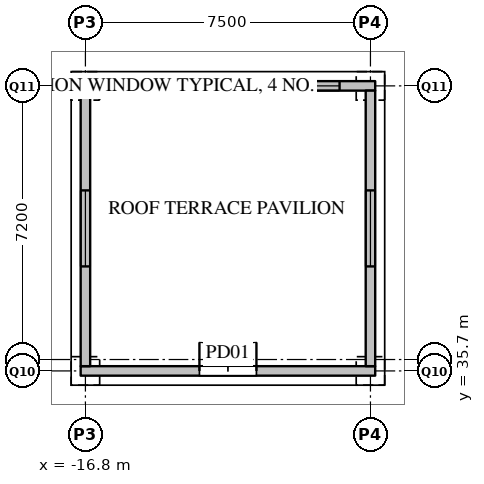
"""IFC4 building model, lengths in metres.
Left out: names, types, materials, properties, quantities, classifications, styles, units other than length and angle.
Written with IfcOpenShell. Run it as: python <this file> out.ifc"""

import sys

from ifc_helpers import new_model, si_unit, direction, frame, frame_2d, origin, place, context, subcontext, project, spatial, rectangle, extrude, element, fill, save


model = new_model("IFC4")
c1 = context("Model", 3, precision=1e-05, world=origin(), true_north=direction((0.0, 1.0)))
c2 = subcontext(c1, "Body", "Model", "MODEL_VIEW")
j1 = project(units=[si_unit("LENGTHUNIT", "METRE"), si_unit("PLANEANGLEUNIT", "RADIAN")], contexts=[c1])
p1 = place(None, origin())
s1 = spatial("IfcSite", under=j1, at=p1, CompositionType="ELEMENT")
p2 = place(p1, origin())
s2 = spatial("IfcBuilding", under=s1, at=p2, CompositionType="ELEMENT")
p3 = place(p2, frame((0.0, 0.0, 26.0)))
s3 = spatial("IfcBuildingStorey", under=s2, at=p3, CompositionType="ELEMENT", Elevation=26.0)
p4 = place(p3, frame((-16.925, 35.7, 0.0), z_axis=(0.0, 0.0, 1.0), x_axis=(1.0, 0.0, 0.0)))
e1 = element("IfcWall", 1, at=p4, inside=s3, PredefinedType="SOLIDWALL", context=c2, shape_type="SweptSolid", body=[
    extrude(rectangle(XDim=7.75, YDim=0.25, at=frame_2d((3.875, 0.0))), origin(), (0.0, 0.0, 1.0), 3.2),
])
p5 = place(p4, frame((3.125, 0.0, 0.0)))
e2 = element("IfcOpeningElement", 2, at=p5, cuts=e1, PredefinedType="OPENING", context=c2, shape_type="SweptSolid", body=[
    extrude(rectangle(XDim=1.5, YDim=2.1, at=frame_2d((0.75, 1.05))), frame((0.0, 0.135, 0.0), z_axis=(0.0, -1.0, 0.0), x_axis=(1.0, 0.0, 0.0)), (0.0, 0.0, 1.0), 0.27),
])
p6 = place(p3, frame((-16.925, 43.2, 0.0), z_axis=(0.0, 0.0, 1.0), x_axis=(1.0, 0.0, 0.0)))
e3 = element("IfcWall", 3, at=p6, inside=s3, PredefinedType="SOLIDWALL", context=c2, shape_type="SweptSolid", body=[
    extrude(rectangle(XDim=7.75, YDim=0.25, at=frame_2d((3.875, 0.0))), origin(), (0.0, 0.0, 1.0), 3.2),
])
p7 = place(p6, frame((0.938, 0.0, 0.9)))
e4 = element("IfcOpeningElement", 4, at=p7, cuts=e3, PredefinedType="OPENING", context=c2, shape_type="SweptSolid", body=[
    extrude(rectangle(XDim=2.0, YDim=1.5, at=frame_2d((1.0, 0.75))), frame((0.0, 0.135, 0.0), z_axis=(0.0, -1.0, 0.0), x_axis=(1.0, 0.0, 0.0)), (0.0, 0.0, 1.0), 0.27),
])
p8 = place(p6, frame((4.812, 0.0, 0.9)))
e5 = element("IfcOpeningElement", 5, at=p8, cuts=e3, PredefinedType="OPENING", context=c2, shape_type="SweptSolid", body=[
    extrude(rectangle(XDim=2.0, YDim=1.5, at=frame_2d((1.0, 0.75))), frame((0.0, 0.135, 0.0), z_axis=(0.0, -1.0, 0.0), x_axis=(1.0, 0.0, 0.0)), (0.0, 0.0, 1.0), 0.27),
])
p9 = place(p3, frame((-16.8, 35.825, 0.0), z_axis=(0.0, 0.0, 1.0), x_axis=(0.0, 1.0, 0.0)))
e6 = element("IfcWall", 6, at=p9, inside=s3, PredefinedType="SOLIDWALL", context=c2, shape_type="SweptSolid", body=[
    extrude(rectangle(XDim=7.25, YDim=0.25, at=frame_2d((3.625, 0.0))), origin(), (0.0, 0.0, 1.0), 3.2),
])
p10 = place(p9, frame((2.625, 0.0, 0.9)))
e7 = element("IfcOpeningElement", 7, at=p10, cuts=e6, PredefinedType="OPENING", context=c2, shape_type="SweptSolid", body=[
    extrude(rectangle(XDim=2.0, YDim=1.5, at=frame_2d((1.0, 0.75))), frame((0.0, 0.135, 0.0), z_axis=(0.0, -1.0, 0.0), x_axis=(1.0, 0.0, 0.0)), (0.0, 0.0, 1.0), 0.27),
])
p11 = place(p3, frame((-9.3, 35.825, 0.0), z_axis=(0.0, 0.0, 1.0), x_axis=(0.0, 1.0, 0.0)))
e8 = element("IfcWall", 8, at=p11, inside=s3, PredefinedType="SOLIDWALL", context=c2, shape_type="SweptSolid", body=[
    extrude(rectangle(XDim=7.25, YDim=0.25, at=frame_2d((3.625, 0.0))), origin(), (0.0, 0.0, 1.0), 3.2),
])
p12 = place(p11, frame((2.625, 0.0, 0.9)))
e9 = element("IfcOpeningElement", 9, at=p12, cuts=e8, PredefinedType="OPENING", context=c2, shape_type="SweptSolid", body=[
    extrude(rectangle(XDim=2.0, YDim=1.5, at=frame_2d((1.0, 0.75))), frame((0.0, 0.135, 0.0), z_axis=(0.0, -1.0, 0.0), x_axis=(1.0, 0.0, 0.0)), (0.0, 0.0, 1.0), 0.27),
])
p13 = place(p5, origin())
e10 = element("IfcDoor", 10, at=p13, inside=s3, OperationType="DOUBLE_DOOR_SINGLE_SWING", PredefinedType="DOOR", context=c2, shape_type="SweptSolid", body=[
    extrude(rectangle(XDim=1.5, YDim=2.1, at=frame_2d((0.75, 1.05))), frame((0.0, 0.025, 0.0), z_axis=(0.0, -1.0, 0.0), x_axis=(1.0, 0.0, 0.0)), (0.0, 0.0, 1.0), 0.05),
])
fill(e2, e10)
p14 = place(p7, origin())
e11 = element("IfcWindow", 11, at=p14, inside=s3, PartitioningType="SINGLE_PANEL", PredefinedType="WINDOW", context=c2, shape_type="SweptSolid", body=[
    extrude(rectangle(XDim=2.0, YDim=1.5, at=frame_2d((1.0, 0.75))), frame((0.0, 0.03, 0.0), z_axis=(0.0, -1.0, 0.0), x_axis=(1.0, 0.0, 0.0)), (0.0, 0.0, 1.0), 0.06),
])
fill(e4, e11)
p15 = place(p8, origin())
e12 = element("IfcWindow", 12, at=p15, inside=s3, PartitioningType="SINGLE_PANEL", PredefinedType="WINDOW", context=c2, shape_type="SweptSolid", body=[
    extrude(rectangle(XDim=2.0, YDim=1.5, at=frame_2d((1.0, 0.75))), frame((0.0, 0.03, 0.0), z_axis=(0.0, -1.0, 0.0), x_axis=(1.0, 0.0, 0.0)), (0.0, 0.0, 1.0), 0.06),
])
fill(e5, e12)
p16 = place(p10, origin())
e13 = element("IfcWindow", 13, at=p16, inside=s3, PartitioningType="SINGLE_PANEL", PredefinedType="WINDOW", context=c2, shape_type="SweptSolid", body=[
    extrude(rectangle(XDim=2.0, YDim=1.5, at=frame_2d((1.0, 0.75))), frame((0.0, 0.03, 0.0), z_axis=(0.0, -1.0, 0.0), x_axis=(1.0, 0.0, 0.0)), (0.0, 0.0, 1.0), 0.06),
])
fill(e7, e13)
p17 = place(p12, origin())
e14 = element("IfcWindow", 14, at=p17, inside=s3, PartitioningType="SINGLE_PANEL", PredefinedType="WINDOW", context=c2, shape_type="SweptSolid", body=[
    extrude(rectangle(XDim=2.0, YDim=1.5, at=frame_2d((1.0, 0.75))), frame((0.0, 0.03, 0.0), z_axis=(0.0, -1.0, 0.0), x_axis=(1.0, 0.0, 0.0)), (0.0, 0.0, 1.0), 0.06),
])
fill(e9, e14)
save(model, sys.argv[1])
